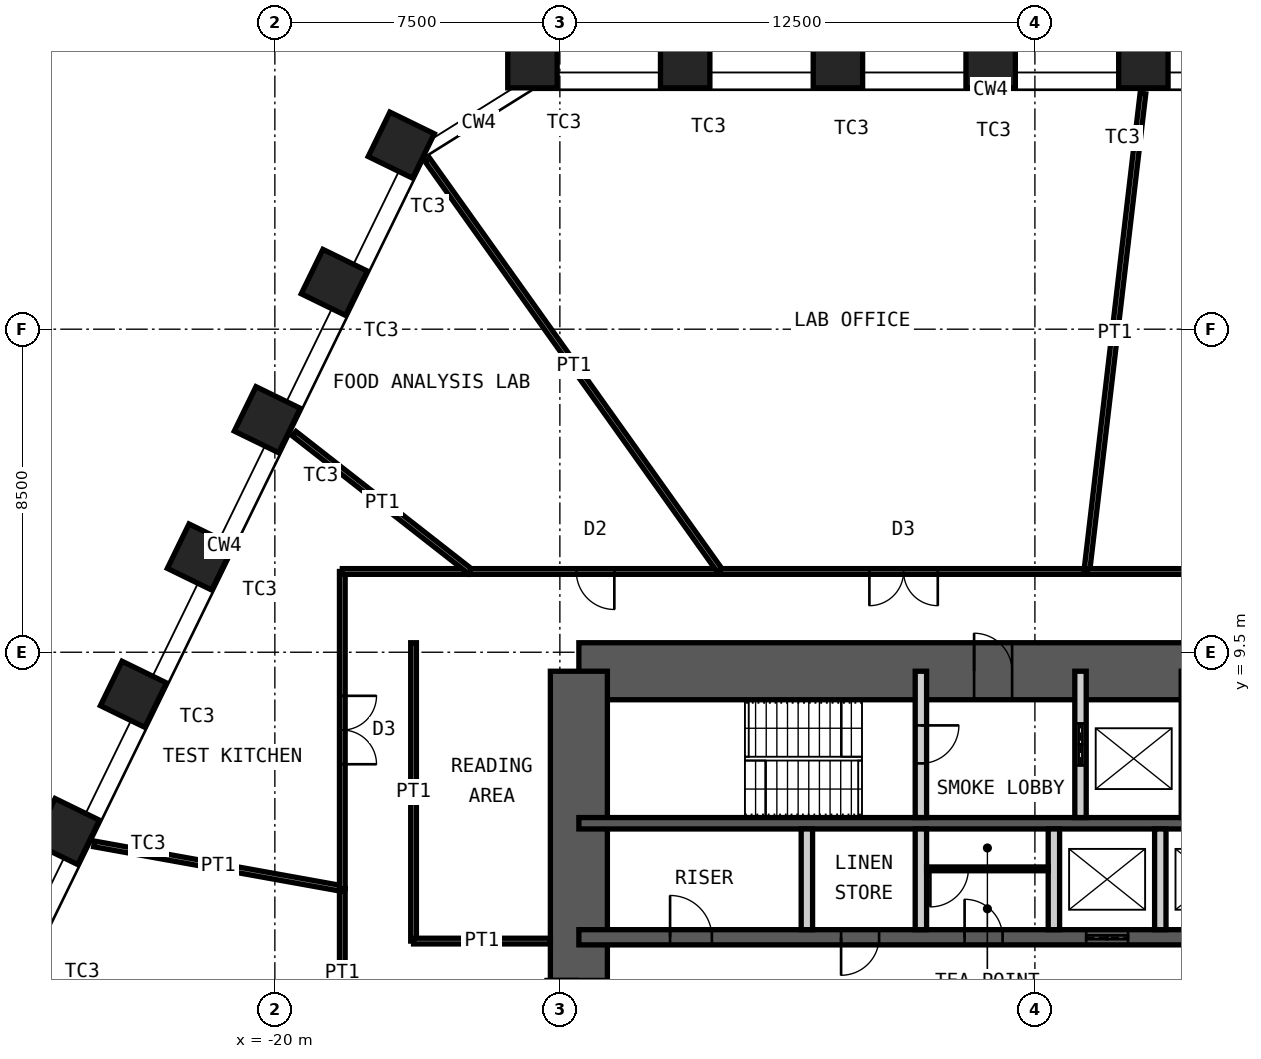
"""IFC4 building model, lengths in metres.
Left out: names, types, materials, properties, quantities, classifications, styles, units other than length and angle.
Written with IfcOpenShell. Run it as: python <this file> out.ifc"""

import sys

from ifc_helpers import new_model, si_unit, direction, frame, frame_2d, origin, origin_2d, place, context, subcontext, project, spatial, rectangle, hollow_rectangle, extrude, element, fill, save


model = new_model("IFC4")
c1 = context("Model", 3, precision=1e-05, world=origin(), true_north=direction((0.0, 1.0)))
c2 = subcontext(c1, "Body", "Model", "MODEL_VIEW")
j1 = project(units=[si_unit("LENGTHUNIT", "METRE"), si_unit("PLANEANGLEUNIT", "RADIAN")], contexts=[c1])
p1 = place(None, origin())
s1 = spatial("IfcSite", under=j1, at=p1, CompositionType="ELEMENT")
p2 = place(p1, origin())
s2 = spatial("IfcBuilding", under=s1, at=p2, CompositionType="ELEMENT")
p3 = place(p2, frame((0.0, 0.0, 124.0)))
s3 = spatial("IfcBuildingStorey", under=s2, at=p3, CompositionType="ELEMENT", Elevation=124.0)
for number, where, z_axis, x_axis in (
    (1, (-13.222, 25.0, 0.0), (0.0, 0.0, 1.0), (-1.0, 0.0, 0.0)),
    (2, (-9.203, 25.0, 0.0), (0.0, 0.0, 1.0), (-1.0, 0.0, 0.0)),
    (3, (-5.184, 25.0, 0.0), (0.0, 0.0, 1.0), (-1.0, 0.0, 0.0)),
    (4, (-1.165, 25.0, 0.0), (0.0, 0.0, 1.0), (-1.0, 0.0, 0.0)),
    (5, (2.854, 25.0, 0.0), (0.0, 0.0, 1.0), (-1.0, 0.0, 0.0)),
    (6, (-25.483, 4.781, 0.0), (0.0, 0.0, 1.0), (-0.438, -0.899, 0.0)),
    (7, (-23.721, 8.394, 0.0), (0.0, 0.0, 1.0), (-0.438, -0.899, 0.0)),
    (8, (-21.959, 12.006, 0.0), (0.0, 0.0, 1.0), (-0.438, -0.899, 0.0)),
    (9, (-20.198, 15.618, 0.0), (0.0, 0.0, 1.0), (-0.438, -0.899, 0.0)),
    (10, (-18.436, 19.23, 0.0), (0.0, 0.0, 1.0), (-0.438, -0.899, 0.0)),
    (11, (-16.674, 22.843, 0.0), (0.0, 0.0, 1.0), (-0.438, -0.899, 0.0)),
):
    element("IfcColumn", number, at=place(p3, frame(where, z_axis=z_axis, x_axis=x_axis)), inside=s3, PredefinedType="COLUMN", context=c2, shape_type="SweptSolid", body=[
        extrude(hollow_rectangle(XDim=1.3, YDim=1.3, WallThickness=0.1, at=origin_2d()), origin(), (0.0, 0.0, 1.0), 4.2),
    ])
p4 = place(p3, frame((-12.0, 9.0, 0.0), z_axis=(0.0, 0.0, 1.0), x_axis=(1.0, 0.0, 0.0)))
e12 = element("IfcWall", 12, at=p4, inside=s3, PredefinedType="SHEAR", context=c2, shape_type="SweptSolid", body=[
    extrude(rectangle(XDim=24.0, YDim=1.5, at=frame_2d((12.0, 0.0))), origin(), (0.0, 0.0, 1.0), 4.2),
])
p5 = place(p4, frame((10.4, 0.0, 0.0)))
e13 = element("IfcOpeningElement", 13, at=p5, cuts=e12, PredefinedType="OPENING", context=c2, shape_type="SweptSolid", body=[
    extrude(rectangle(XDim=1.0, YDim=2.1, at=frame_2d((0.5, 1.05))), frame((0.0, 0.76, 0.0), z_axis=(0.0, -1.0, 0.0), x_axis=(1.0, 0.0, 0.0)), (0.0, 0.0, 1.0), 1.52),
])
p6 = place(p4, frame((17.6, 0.0, 0.0)))
e14 = element("IfcOpeningElement", 14, at=p6, cuts=e12, PredefinedType="OPENING", context=c2, shape_type="SweptSolid", body=[
    extrude(rectangle(XDim=0.9, YDim=2.1, at=frame_2d((0.45, 1.05))), frame((0.0, 0.76, 0.0), z_axis=(0.0, -1.0, 0.0), x_axis=(1.0, 0.0, 0.0)), (0.0, 0.0, 1.0), 1.52),
])
p7 = place(p4, frame((21.9, 0.0, 0.0)))
e15 = element("IfcOpeningElement", 15, at=p7, cuts=e12, PredefinedType="OPENING", context=c2, shape_type="SweptSolid", body=[
    extrude(rectangle(XDim=0.9, YDim=2.1, at=frame_2d((0.45, 1.05))), frame((0.0, 0.76, 0.0), z_axis=(0.0, -1.0, 0.0), x_axis=(1.0, 0.0, 0.0)), (0.0, 0.0, 1.0), 1.52),
])
p8 = place(p3, frame((-12.0, -9.0, 0.0), z_axis=(0.0, 0.0, 1.0), x_axis=(0.0, 1.0, 0.0)))
e16 = element("IfcWall", 16, at=p8, inside=s3, PredefinedType="SHEAR", context=c2, shape_type="SweptSolid", body=[
    extrude(rectangle(XDim=18.0, YDim=1.5, at=frame_2d((9.0, 0.0))), origin(), (0.0, 0.0, 1.0), 4.2),
])
p9 = place(p8, frame((8.1, 0.0, 0.0)))
e17 = element("IfcOpeningElement", 17, at=p9, cuts=e16, PredefinedType="OPENING", context=c2, shape_type="SweptSolid", body=[
    extrude(rectangle(XDim=1.8, YDim=2.1, at=frame_2d((0.9, 1.05))), frame((0.0, 0.76, 0.0), z_axis=(0.0, -1.0, 0.0), x_axis=(1.0, 0.0, 0.0)), (0.0, 0.0, 1.0), 1.52),
])
p10 = place(p3, frame((-12.0, 5.0, 0.0), z_axis=(0.0, 0.0, 1.0), x_axis=(1.0, 0.0, 0.0)))
e18 = element("IfcWall", 18, at=p10, inside=s3, PredefinedType="SHEAR", context=c2, shape_type="SweptSolid", body=[
    extrude(rectangle(XDim=24.0, YDim=0.3, at=frame_2d((12.0, 0.0))), origin(), (0.0, 0.0, 1.0), 4.2),
])
p11 = place(p3, frame((-12.0, 2.0, 0.0), z_axis=(0.0, 0.0, 1.0), x_axis=(1.0, 0.0, 0.0)))
e19 = element("IfcWall", 19, at=p11, inside=s3, PredefinedType="SHEAR", context=c2, shape_type="SweptSolid", body=[
    extrude(rectangle(XDim=24.0, YDim=0.4, at=frame_2d((12.0, 0.0))), origin(), (0.0, 0.0, 1.0), 4.2),
])
p12 = place(p11, frame((2.4, 0.0, 0.0)))
e20 = element("IfcOpeningElement", 20, at=p12, cuts=e19, PredefinedType="OPENING", context=c2, shape_type="SweptSolid", body=[
    extrude(rectangle(XDim=1.1, YDim=2.1, at=frame_2d((0.55, 1.05))), frame((0.0, 0.21, 0.0), z_axis=(0.0, -1.0, 0.0), x_axis=(1.0, 0.0, 0.0)), (0.0, 0.0, 1.0), 0.42),
])
p13 = place(p11, frame((22.0, 0.0, 0.0)))
e21 = element("IfcOpeningElement", 21, at=p13, cuts=e19, PredefinedType="OPENING", context=c2, shape_type="SweptSolid", body=[
    extrude(rectangle(XDim=1.1, YDim=2.1, at=frame_2d((0.55, 1.05))), frame((0.0, 0.21, 0.0), z_axis=(0.0, -1.0, 0.0), x_axis=(1.0, 0.0, 0.0)), (0.0, 0.0, 1.0), 0.42),
])
p14 = place(p11, frame((10.15, 0.0, 0.0)))
e22 = element("IfcOpeningElement", 22, at=p14, cuts=e19, PredefinedType="OPENING", context=c2, shape_type="SweptSolid", body=[
    extrude(rectangle(XDim=1.0, YDim=2.1, at=frame_2d((0.5, 1.05))), frame((0.0, 0.21, 0.0), z_axis=(0.0, -1.0, 0.0), x_axis=(1.0, 0.0, 0.0)), (0.0, 0.0, 1.0), 0.42),
])
p15 = place(p11, frame((6.9, 0.0, 0.0)))
e23 = element("IfcOpeningElement", 23, at=p15, cuts=e19, PredefinedType="OPENING", context=c2, shape_type="SweptSolid", body=[
    extrude(rectangle(XDim=1.0, YDim=2.1, at=frame_2d((0.5, 1.05))), frame((0.0, 0.21, 0.0), z_axis=(0.0, -1.0, 0.0), x_axis=(1.0, 0.0, 0.0)), (0.0, 0.0, 1.0), 0.42),
])
p16 = place(p11, frame((13.35, 0.0, 0.0)))
e24 = element("IfcOpeningElement", 24, at=p16, cuts=e19, PredefinedType="OPENING", context=c2, shape_type="SweptSolid", body=[
    extrude(rectangle(XDim=1.1, YDim=2.4, at=frame_2d((0.55, 1.2))), frame((0.0, 0.21, 0.0), z_axis=(0.0, -1.0, 0.0), x_axis=(1.0, 0.0, 0.0)), (0.0, 0.0, 1.0), 0.42),
])
p17 = place(p11, frame((16.15, 0.0, 0.0)))
e25 = element("IfcOpeningElement", 25, at=p17, cuts=e19, PredefinedType="OPENING", context=c2, shape_type="SweptSolid", body=[
    extrude(rectangle(XDim=1.1, YDim=2.4, at=frame_2d((0.55, 1.2))), frame((0.0, 0.21, 0.0), z_axis=(0.0, -1.0, 0.0), x_axis=(1.0, 0.0, 0.0)), (0.0, 0.0, 1.0), 0.42),
])
p18 = place(p11, frame((18.95, 0.0, 0.0)))
e26 = element("IfcOpeningElement", 26, at=p18, cuts=e19, PredefinedType="OPENING", context=c2, shape_type="SweptSolid", body=[
    extrude(rectangle(XDim=1.1, YDim=2.4, at=frame_2d((0.55, 1.2))), frame((0.0, 0.21, 0.0), z_axis=(0.0, -1.0, 0.0), x_axis=(1.0, 0.0, 0.0)), (0.0, 0.0, 1.0), 0.42),
])
p19 = place(p3, frame((-3.0, 5.15, 0.0), z_axis=(0.0, 0.0, 1.0), x_axis=(0.0, 1.0, 0.0)))
e27 = element("IfcWall", 27, at=p19, inside=s3, PredefinedType="PARTITIONING", context=c2, shape_type="SweptSolid", body=[
    extrude(rectangle(XDim=3.85, YDim=0.3, at=frame_2d((1.925, 0.0))), origin(), (0.0, 0.0, 1.0), 3.98),
])
p20 = place(p19, frame((1.425, 0.0, 0.0)))
e28 = element("IfcOpeningElement", 28, at=p20, cuts=e27, PredefinedType="OPENING", context=c2, shape_type="SweptSolid", body=[
    extrude(rectangle(XDim=1.0, YDim=2.1, at=frame_2d((0.5, 1.05))), frame((0.0, 0.16, 0.0), z_axis=(0.0, -1.0, 0.0), x_axis=(1.0, 0.0, 0.0)), (0.0, 0.0, 1.0), 0.32),
])
p21 = place(p3, frame((1.2, 5.15, 0.0), z_axis=(0.0, 0.0, 1.0), x_axis=(0.0, 1.0, 0.0)))
e29 = element("IfcWall", 29, at=p21, inside=s3, PredefinedType="PARTITIONING", context=c2, shape_type="SweptSolid", body=[
    extrude(rectangle(XDim=3.85, YDim=0.3, at=frame_2d((1.925, 0.0))), origin(), (0.0, 0.0, 1.0), 3.98),
])
p22 = place(p21, frame((1.375, 0.0, 0.0)))
e30 = element("IfcOpeningElement", 30, at=p22, cuts=e29, PredefinedType="OPENING", context=c2, shape_type="SweptSolid", body=[
    extrude(rectangle(XDim=1.1, YDim=2.4, at=frame_2d((0.55, 1.2))), frame((0.0, 0.16, 0.0), z_axis=(0.0, -1.0, 0.0), x_axis=(1.0, 0.0, 0.0)), (0.0, 0.0, 1.0), 0.32),
])
p23 = place(p3, frame((4.0, 5.15, 0.0), z_axis=(0.0, 0.0, 1.0), x_axis=(0.0, 1.0, 0.0)))
e31 = element("IfcWall", 31, at=p23, inside=s3, PredefinedType="PARTITIONING", context=c2, shape_type="SweptSolid", body=[
    extrude(rectangle(XDim=3.85, YDim=0.3, at=frame_2d((1.925, 0.0))), origin(), (0.0, 0.0, 1.0), 3.98),
])
for number, where, z_axis, x_axis in (
    (32, (-6.0, 2.2, 0.0), (0.0, 0.0, 1.0), (0.0, 1.0, 0.0)),
    (33, (-3.0, 2.2, 0.0), (0.0, 0.0, 1.0), (0.0, 1.0, 0.0)),
    (34, (0.5, 2.2, 0.0), (0.0, 0.0, 1.0), (0.0, 1.0, 0.0)),
    (35, (3.3, 2.2, 0.0), (0.0, 0.0, 1.0), (0.0, 1.0, 0.0)),
):
    element("IfcWall", number, at=place(p3, frame(where, z_axis=z_axis, x_axis=x_axis)), inside=s3, PredefinedType="PARTITIONING", context=c2, shape_type="SweptSolid", body=[
        extrude(rectangle(XDim=2.65, YDim=0.3, at=frame_2d((1.325, 0.0))), origin(), (0.0, 0.0, 1.0), 3.98),
    ])
p24 = place(p3, frame((-2.85, 3.8, 0.0), z_axis=(0.0, 0.0, 1.0), x_axis=(1.0, 0.0, 0.0)))
e36 = element("IfcWall", 36, at=p24, inside=s3, PredefinedType="PARTITIONING", context=c2, shape_type="SweptSolid", body=[
    extrude(rectangle(XDim=3.2, YDim=0.1, at=frame_2d((1.6, 0.0))), origin(), (0.0, 0.0, 1.0), 3.98),
])
p25 = place(p24, frame((0.1, 0.0, 0.0)))
e37 = element("IfcOpeningElement", 37, at=p25, cuts=e36, PredefinedType="OPENING", context=c2, shape_type="SweptSolid", body=[
    extrude(rectangle(XDim=1.0, YDim=2.4, at=frame_2d((0.5, 1.2))), frame((0.0, 0.06, 0.0), z_axis=(0.0, -1.0, 0.0), x_axis=(1.0, 0.0, 0.0)), (0.0, 0.0, 1.0), 0.12),
])
p26 = place(p3, frame((-18.225, -7.849, 0.0), z_axis=(0.0, 0.0, 1.0), x_axis=(0.0, 1.0, 0.0)))
e38 = element("IfcWall", 38, at=p26, inside=s3, PredefinedType="PARTITIONING", context=c2, shape_type="SweptSolid", body=[
    extrude(rectangle(XDim=11.13, YDim=0.15, at=frame_2d((5.565, 0.0))), origin(), (0.0, 0.0, 1.0), 4.03),
])
p27 = place(p26, frame((4.665, 0.0, 0.0)))
e39 = element("IfcOpeningElement", 39, at=p27, cuts=e38, PredefinedType="OPENING", context=c2, shape_type="SweptSolid", body=[
    extrude(rectangle(XDim=1.8, YDim=2.4, at=frame_2d((0.9, 1.2))), frame((0.0, 0.085, 0.0), z_axis=(0.0, -1.0, 0.0), x_axis=(1.0, 0.0, 0.0)), (0.0, 0.0, 1.0), 0.17),
])
p28 = place(p3, frame((-24.755, 4.457, 0.0), z_axis=(0.0, 0.0, 1.0), x_axis=(0.984174598206, -0.177201467959, 0.0)))
e40 = element("IfcWall", 40, at=p28, inside=s3, PredefinedType="PARTITIONING", context=c2, shape_type="SweptSolid", body=[
    extrude(rectangle(XDim=6.635, YDim=0.15, at=frame_2d((3.318, 0.0))), origin(), (0.0, 0.0, 1.0), 3.33),
])
p29 = place(p3, frame((-18.225, 3.281, 0.0), z_axis=(0.0, 0.0, 1.0), x_axis=(0.0, 1.0, 0.0)))
e41 = element("IfcWall", 41, at=p29, inside=s3, PredefinedType="PARTITIONING", context=c2, shape_type="SweptSolid", body=[
    extrude(rectangle(XDim=8.344, YDim=0.15, at=frame_2d((4.172, 0.0))), origin(), (0.0, 0.0, 1.0), 4.03),
])
p30 = place(p29, frame((3.272, 0.0, 0.0)))
e42 = element("IfcOpeningElement", 42, at=p30, cuts=e41, PredefinedType="OPENING", context=c2, shape_type="SweptSolid", body=[
    extrude(rectangle(XDim=1.8, YDim=2.4, at=frame_2d((0.9, 1.2))), frame((0.0, 0.085, 0.0), z_axis=(0.0, -1.0, 0.0), x_axis=(1.0, 0.0, 0.0)), (0.0, 0.0, 1.0), 0.17),
])
p31 = place(p3, frame((-18.225, 11.625, 0.0), z_axis=(0.0, 0.0, 1.0), x_axis=(1.0, 0.0, 0.0)))
e43 = element("IfcWall", 43, at=p31, inside=s3, PredefinedType="PARTITIONING", context=c2, shape_type="SweptSolid", body=[
    extrude(rectangle(XDim=3.368, YDim=0.15, at=frame_2d((1.684, 0.0))), origin(), (0.0, 0.0, 1.0), 4.03),
])
p32 = place(p3, frame((-19.49, 15.25, 0.0), z_axis=(0.0, 0.0, 1.0), x_axis=(0.787549668605, -0.616251182133, 0.0)))
e44 = element("IfcWall", 44, at=p32, inside=s3, PredefinedType="PARTITIONING", context=c2, shape_type="SweptSolid", body=[
    extrude(rectangle(XDim=5.882, YDim=0.15, at=frame_2d((2.941, 0.0))), origin(), (0.0, 0.0, 1.0), 3.33),
])
p33 = place(p3, frame((-14.857, 11.625, 0.0), z_axis=(0.0, 0.0, 1.0), x_axis=(1.0, 0.0, 0.0)))
e45 = element("IfcWall", 45, at=p33, inside=s3, PredefinedType="PARTITIONING", context=c2, shape_type="SweptSolid", body=[
    extrude(rectangle(XDim=6.581, YDim=0.15, at=frame_2d((3.29, 0.0))), origin(), (0.0, 0.0, 1.0), 4.03),
])
p34 = place(p33, frame((2.79, 0.0, 0.0)))
e46 = element("IfcOpeningElement", 46, at=p34, cuts=e45, PredefinedType="OPENING", context=c2, shape_type="SweptSolid", body=[
    extrude(rectangle(XDim=1.0, YDim=2.4, at=frame_2d((0.5, 1.2))), frame((0.0, 0.085, 0.0), z_axis=(0.0, -1.0, 0.0), x_axis=(1.0, 0.0, 0.0)), (0.0, 0.0, 1.0), 0.17),
])
p35 = place(p3, frame((-15.987, 22.455, 0.0), z_axis=(0.0, 0.0, 1.0), x_axis=(0.579969304452, -0.814638328274, 0.0)))
e47 = element("IfcWall", 47, at=p35, inside=s3, PredefinedType="PARTITIONING", context=c2, shape_type="SweptSolid", body=[
    extrude(rectangle(XDim=13.294, YDim=0.15, at=frame_2d((6.647, 0.0))), origin(), (0.0, 0.0, 1.0), 2.93),
])
p36 = place(p3, frame((-8.277, 11.625, 0.0), z_axis=(0.0, 0.0, 1.0), x_axis=(1.0, 0.0, 0.0)))
e48 = element("IfcWall", 48, at=p36, inside=s3, PredefinedType="PARTITIONING", context=c2, shape_type="SweptSolid", body=[
    extrude(rectangle(XDim=9.642, YDim=0.15, at=frame_2d((4.821, 0.0))), origin(), (0.0, 0.0, 1.0), 4.03),
])
p37 = place(p36, frame((3.921, 0.0, 0.0)))
e49 = element("IfcOpeningElement", 49, at=p37, cuts=e48, PredefinedType="OPENING", context=c2, shape_type="SweptSolid", body=[
    extrude(rectangle(XDim=1.8, YDim=2.4, at=frame_2d((0.9, 1.2))), frame((0.0, 0.085, 0.0), z_axis=(0.0, -1.0, 0.0), x_axis=(1.0, 0.0, 0.0)), (0.0, 0.0, 1.0), 0.17),
])
p38 = place(p3, frame((2.843, 24.201, 0.0), z_axis=(0.0, 0.0, 1.0), x_axis=(-0.116670084723, -0.993170726175, 0.0)))
e50 = element("IfcWall", 50, at=p38, inside=s3, PredefinedType="PARTITIONING", context=c2, shape_type="SweptSolid", body=[
    extrude(rectangle(XDim=12.662, YDim=0.15, at=frame_2d((6.331, 0.0))), origin(), (0.0, 0.0, 1.0), 3.33),
])
p39 = place(p3, frame((1.366, 11.625, 0.0), z_axis=(0.0, 0.0, 1.0), x_axis=(1.0, 0.0, 0.0)))
e51 = element("IfcWall", 51, at=p39, inside=s3, PredefinedType="PARTITIONING", context=c2, shape_type="SweptSolid", body=[
    extrude(rectangle(XDim=16.259, YDim=0.15, at=frame_2d((8.13, 0.0))), origin(), (0.0, 0.0, 1.0), 4.03),
])
p40 = place(p39, frame((7.23, 0.0, 0.0)))
e52 = element("IfcOpeningElement", 52, at=p40, cuts=e51, PredefinedType="OPENING", context=c2, shape_type="SweptSolid", body=[
    extrude(rectangle(XDim=1.8, YDim=2.4, at=frame_2d((0.9, 1.2))), frame((0.0, 0.085, 0.0), z_axis=(0.0, -1.0, 0.0), x_axis=(1.0, 0.0, 0.0)), (0.0, 0.0, 1.0), 0.17),
])
p41 = place(p3, frame((-16.35, 1.9, 0.0), z_axis=(0.0, 0.0, 1.0), x_axis=(0.0, 1.0, 0.0)))
e53 = element("IfcWall", 53, at=p41, inside=s3, PredefinedType="PARTITIONING", context=c2, shape_type="SweptSolid", body=[
    extrude(rectangle(XDim=7.85, YDim=0.15, at=frame_2d((3.925, 0.0))), origin(), (0.0, 0.0, 1.0), 4.03),
])
p42 = place(p3, frame((-12.75, 1.9, 0.0), z_axis=(0.0, 0.0, 1.0), x_axis=(-1.0, 0.0, 0.0)))
e54 = element("IfcWall", 54, at=p42, inside=s3, PredefinedType="PARTITIONING", context=c2, shape_type="SweptSolid", body=[
    extrude(rectangle(XDim=3.6, YDim=0.15, at=frame_2d((1.8, 0.0))), origin(), (0.0, 0.0, 1.0), 3.33),
])
p43 = place(p5, origin())
e55 = element("IfcDoor", 55, at=p43, inside=s3, OperationType="SINGLE_SWING_RIGHT", PredefinedType="DOOR", context=c2, shape_type="SweptSolid", body=[
    extrude(rectangle(XDim=1.0, YDim=2.1, at=frame_2d((0.5, 1.05))), frame((0.0, 0.025, 0.0), z_axis=(0.0, -1.0, 0.0), x_axis=(1.0, 0.0, 0.0)), (0.0, 0.0, 1.0), 0.05),
])
fill(e13, e55)
p44 = place(p20, origin())
e56 = element("IfcDoor", 56, at=p44, inside=s3, OperationType="SINGLE_SWING_RIGHT", PredefinedType="DOOR", context=c2, shape_type="SweptSolid", body=[
    extrude(rectangle(XDim=1.0, YDim=2.1, at=frame_2d((0.5, 1.05))), frame((0.0, 0.025, 0.0), z_axis=(0.0, -1.0, 0.0), x_axis=(1.0, 0.0, 0.0)), (0.0, 0.0, 1.0), 0.05),
])
fill(e28, e56)
p45 = place(p12, origin())
e57 = element("IfcDoor", 57, at=p45, inside=s3, OperationType="SINGLE_SWING_RIGHT", PredefinedType="DOOR", context=c2, shape_type="SweptSolid", body=[
    extrude(rectangle(XDim=1.1, YDim=2.1, at=frame_2d((0.55, 1.05))), frame((0.0, 0.025, 0.0), z_axis=(0.0, -1.0, 0.0), x_axis=(1.0, 0.0, 0.0)), (0.0, 0.0, 1.0), 0.05),
])
fill(e20, e57)
p46 = place(p14, origin())
e58 = element("IfcDoor", 58, at=p46, inside=s3, OperationType="SINGLE_SWING_RIGHT", PredefinedType="DOOR", context=c2, shape_type="SweptSolid", body=[
    extrude(rectangle(XDim=1.0, YDim=2.1, at=frame_2d((0.5, 1.05))), frame((0.0, 0.025, 0.0), z_axis=(0.0, -1.0, 0.0), x_axis=(1.0, 0.0, 0.0)), (0.0, 0.0, 1.0), 0.05),
])
fill(e22, e58)
p47 = place(p9, origin())
e59 = element("IfcDoor", 59, at=p47, inside=s3, OperationType="DOUBLE_DOOR_DOUBLE_SWING", PredefinedType="DOOR", context=c2, shape_type="SweptSolid", body=[
    extrude(rectangle(XDim=1.8, YDim=2.1, at=frame_2d((0.9, 1.05))), frame((0.0, 0.025, 0.0), z_axis=(0.0, -1.0, 0.0), x_axis=(1.0, 0.0, 0.0)), (0.0, 0.0, 1.0), 0.05),
])
fill(e17, e59)
p48 = place(p22, origin())
e60 = element("IfcDoor", 60, at=p48, inside=s3, OperationType="DOUBLE_DOOR_SLIDING", PredefinedType="DOOR", context=c2, shape_type="SweptSolid", body=[
    extrude(rectangle(XDim=1.1, YDim=2.4, at=frame_2d((0.55, 1.2))), frame((0.0, 0.025, 0.0), z_axis=(0.0, -1.0, 0.0), x_axis=(1.0, 0.0, 0.0)), (0.0, 0.0, 1.0), 0.05),
])
fill(e30, e60)
p49 = place(p15, origin())
e61 = element("IfcDoor", 61, at=p49, inside=s3, OperationType="SINGLE_SWING_LEFT", PredefinedType="DOOR", context=c2, shape_type="SweptSolid", body=[
    extrude(rectangle(XDim=1.0, YDim=2.1, at=frame_2d((0.5, 1.05))), frame((0.0, 0.025, 0.0), z_axis=(0.0, -1.0, 0.0), x_axis=(1.0, 0.0, 0.0)), (0.0, 0.0, 1.0), 0.05),
])
fill(e23, e61)
p50 = place(p16, origin())
e62 = element("IfcDoor", 62, at=p50, inside=s3, OperationType="DOUBLE_DOOR_SLIDING", PredefinedType="DOOR", context=c2, shape_type="SweptSolid", body=[
    extrude(rectangle(XDim=1.1, YDim=2.4, at=frame_2d((0.55, 1.2))), frame((0.0, 0.025, 0.0), z_axis=(0.0, -1.0, 0.0), x_axis=(1.0, 0.0, 0.0)), (0.0, 0.0, 1.0), 0.05),
])
fill(e24, e62)
p51 = place(p25, origin())
e63 = element("IfcDoor", 63, at=p51, inside=s3, OperationType="SINGLE_SWING_LEFT", PredefinedType="DOOR", context=c2, shape_type="SweptSolid", body=[
    extrude(rectangle(XDim=1.0, YDim=2.4, at=frame_2d((0.5, 1.2))), frame((0.0, 0.025, 0.0), z_axis=(0.0, -1.0, 0.0), x_axis=(1.0, 0.0, 0.0)), (0.0, 0.0, 1.0), 0.05),
])
fill(e37, e63)
p52 = place(p30, origin())
e64 = element("IfcDoor", 64, at=p52, inside=s3, OperationType="DOUBLE_DOOR_DOUBLE_SWING", PredefinedType="DOOR", context=c2, shape_type="SweptSolid", body=[
    extrude(rectangle(XDim=1.8, YDim=2.4, at=frame_2d((0.9, 1.2))), frame((0.0, 0.025, 0.0), z_axis=(0.0, -1.0, 0.0), x_axis=(1.0, 0.0, 0.0)), (0.0, 0.0, 1.0), 0.05),
])
fill(e42, e64)
p53 = place(p34, origin())
e65 = element("IfcDoor", 65, at=p53, inside=s3, OperationType="SINGLE_SWING_RIGHT", PredefinedType="DOOR", context=c2, shape_type="SweptSolid", body=[
    extrude(rectangle(XDim=1.0, YDim=2.4, at=frame_2d((0.5, 1.2))), frame((0.0, 0.025, 0.0), z_axis=(0.0, -1.0, 0.0), x_axis=(1.0, 0.0, 0.0)), (0.0, 0.0, 1.0), 0.05),
])
fill(e46, e65)
p54 = place(p37, origin())
e66 = element("IfcDoor", 66, at=p54, inside=s3, OperationType="DOUBLE_DOOR_DOUBLE_SWING", PredefinedType="DOOR", context=c2, shape_type="SweptSolid", body=[
    extrude(rectangle(XDim=1.8, YDim=2.4, at=frame_2d((0.9, 1.2))), frame((0.0, 0.025, 0.0), z_axis=(0.0, -1.0, 0.0), x_axis=(1.0, 0.0, 0.0)), (0.0, 0.0, 1.0), 0.05),
])
fill(e49, e66)
save(model, sys.argv[1])
